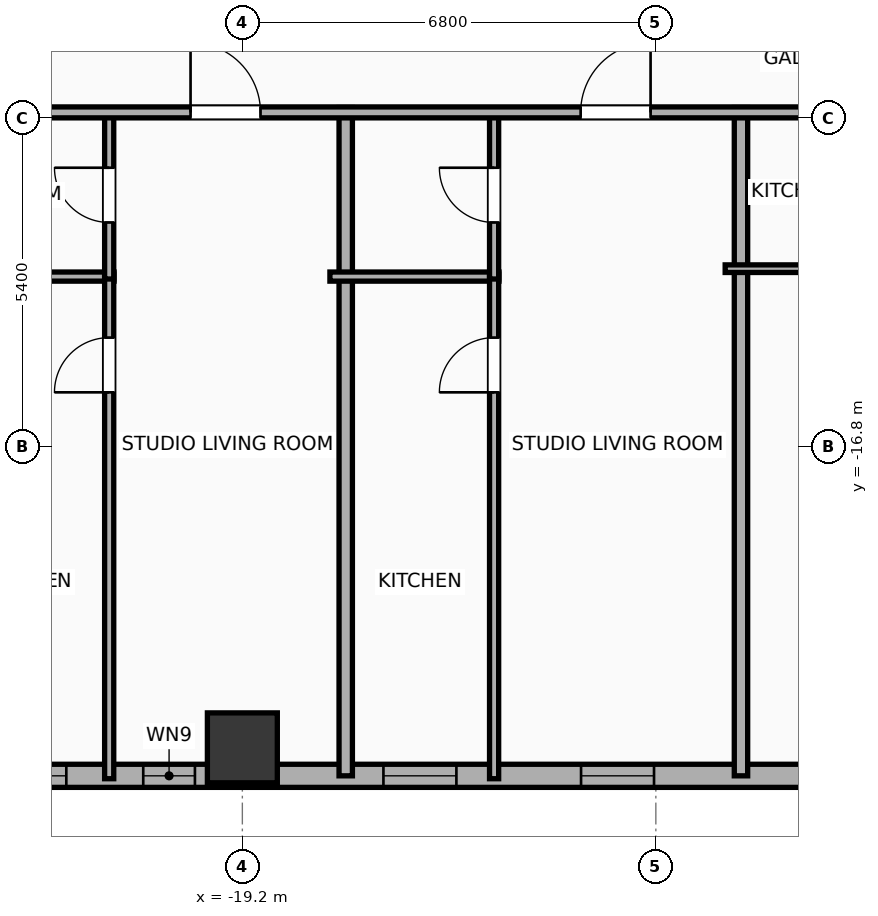
"""IFC4 building model, lengths in metres.
Left out: names, types, materials, properties, quantities, classifications, styles, units other than length and angle.
Written with IfcOpenShell. Run it as: python <this file> out.ifc"""

import sys

from ifc_helpers import new_model, si_unit, direction, frame, frame_2d, origin, origin_2d, place, context, subcontext, project, spatial, rectangle, hollow_rectangle, extrude, element, fill, save


model = new_model("IFC4")
c1 = context("Model", 3, precision=1e-05, world=origin(), true_north=direction((0.0, 1.0)))
c2 = subcontext(c1, "Body", "Model", "MODEL_VIEW")
j1 = project(units=[si_unit("LENGTHUNIT", "METRE"), si_unit("PLANEANGLEUNIT", "RADIAN")], contexts=[c1])
p1 = place(None, origin())
s1 = spatial("IfcSite", under=j1, at=p1, CompositionType="ELEMENT")
p2 = place(p1, origin())
s2 = spatial("IfcBuilding", under=s1, at=p2, CompositionType="ELEMENT")
p3 = place(p2, frame((0.0, 0.0, 49.4)))
s3 = spatial("IfcBuildingStorey", under=s2, at=p3, CompositionType="ELEMENT", Elevation=49.4)
p4 = place(p3, frame((-19.2, -21.75, 0.0), z_axis=(0.0, 0.0, 1.0), x_axis=(1.0, 0.0, 0.0)))
e1 = element("IfcColumn", 1, at=p4, inside=s3, PredefinedType="COLUMN", context=c2, shape_type="SweptSolid", body=[
    extrude(hollow_rectangle(XDim=1.15, YDim=1.15, WallThickness=0.04, at=origin_2d()), origin(), (0.0, 0.0, 1.0), 3.9),
])
p5 = place(p3, frame((22.381, -22.21, 0.0), z_axis=(0.0, 0.0, 1.0), x_axis=(-1.0, 0.0, 0.0)))
e2 = element("IfcWall", 2, at=p5, inside=s3, PredefinedType="ELEMENTEDWALL", context=c2, shape_type="SweptSolid", body=[
    extrude(rectangle(XDim=51.963, YDim=0.38, at=frame_2d((25.981, 0.0))), origin(), (0.0, 0.0, 1.0), 3.65),
])
p6 = place(p5, frame((49.952, 0.0, 0.75)))
e3 = element("IfcOpeningElement", 3, at=p6, cuts=e2, PredefinedType="OPENING", context=c2, shape_type="SweptSolid", body=[
    extrude(rectangle(XDim=1.2, YDim=2.05, at=frame_2d((0.6, 1.025))), frame((0.0, 0.2, 0.0), z_axis=(0.0, -1.0, 0.0), x_axis=(1.0, 0.0, 0.0)), (0.0, 0.0, 1.0), 0.4),
])
p7 = place(p5, frame((47.486, 0.0, 0.75)))
e4 = element("IfcOpeningElement", 4, at=p7, cuts=e2, PredefinedType="OPENING", context=c2, shape_type="SweptSolid", body=[
    extrude(rectangle(XDim=1.2, YDim=2.05, at=frame_2d((0.6, 1.025))), frame((0.0, 0.2, 0.0), z_axis=(0.0, -1.0, 0.0), x_axis=(1.0, 0.0, 0.0)), (0.0, 0.0, 1.0), 0.4),
])
p8 = place(p5, frame((42.361, 0.0, 0.75)))
e5 = element("IfcOpeningElement", 5, at=p8, cuts=e2, PredefinedType="OPENING", context=c2, shape_type="SweptSolid", body=[
    extrude(rectangle(XDim=0.85, YDim=2.05, at=frame_2d((0.425, 1.025))), frame((0.0, 0.2, 0.0), z_axis=(0.0, -1.0, 0.0), x_axis=(1.0, 0.0, 0.0)), (0.0, 0.0, 1.0), 0.4),
])
p9 = place(p5, frame((44.476, 0.0, 0.75)))
e6 = element("IfcOpeningElement", 6, at=p9, cuts=e2, PredefinedType="OPENING", context=c2, shape_type="SweptSolid", body=[
    extrude(rectangle(XDim=1.2, YDim=2.05, at=frame_2d((0.6, 1.025))), frame((0.0, 0.2, 0.0), z_axis=(0.0, -1.0, 0.0), x_axis=(1.0, 0.0, 0.0)), (0.0, 0.0, 1.0), 0.4),
])
p10 = place(p5, frame((34.811, 0.0, 0.75)))
e7 = element("IfcOpeningElement", 7, at=p10, cuts=e2, PredefinedType="OPENING", context=c2, shape_type="SweptSolid", body=[
    extrude(rectangle(XDim=1.2, YDim=2.05, at=frame_2d((0.6, 1.025))), frame((0.0, 0.2, 0.0), z_axis=(0.0, -1.0, 0.0), x_axis=(1.0, 0.0, 0.0)), (0.0, 0.0, 1.0), 0.4),
])
p11 = place(p5, frame((38.061, 0.0, 0.75)))
e8 = element("IfcOpeningElement", 8, at=p11, cuts=e2, PredefinedType="OPENING", context=c2, shape_type="SweptSolid", body=[
    extrude(rectangle(XDim=1.2, YDim=2.05, at=frame_2d((0.6, 1.025))), frame((0.0, 0.2, 0.0), z_axis=(0.0, -1.0, 0.0), x_axis=(1.0, 0.0, 0.0)), (0.0, 0.0, 1.0), 0.4),
])
p12 = place(p5, frame((29.171, 0.0, 0.75)))
e9 = element("IfcOpeningElement", 9, at=p12, cuts=e2, PredefinedType="OPENING", context=c2, shape_type="SweptSolid", body=[
    extrude(rectangle(XDim=1.2, YDim=2.05, at=frame_2d((0.6, 1.025))), frame((0.0, 0.2, 0.0), z_axis=(0.0, -1.0, 0.0), x_axis=(1.0, 0.0, 0.0)), (0.0, 0.0, 1.0), 0.4),
])
p13 = place(p5, frame((21.757, 0.0, 0.75)))
e10 = element("IfcOpeningElement", 10, at=p13, cuts=e2, PredefinedType="OPENING", context=c2, shape_type="SweptSolid", body=[
    extrude(rectangle(XDim=1.2, YDim=2.05, at=frame_2d((0.6, 1.025))), frame((0.0, 0.2, 0.0), z_axis=(0.0, -1.0, 0.0), x_axis=(1.0, 0.0, 0.0)), (0.0, 0.0, 1.0), 0.4),
])
p14 = place(p5, frame((25.007, 0.0, 0.75)))
e11 = element("IfcOpeningElement", 11, at=p14, cuts=e2, PredefinedType="OPENING", context=c2, shape_type="SweptSolid", body=[
    extrude(rectangle(XDim=1.2, YDim=2.05, at=frame_2d((0.6, 1.025))), frame((0.0, 0.2, 0.0), z_axis=(0.0, -1.0, 0.0), x_axis=(1.0, 0.0, 0.0)), (0.0, 0.0, 1.0), 0.4),
])
p15 = place(p5, frame((17.697, 0.0, 0.75)))
e12 = element("IfcOpeningElement", 12, at=p15, cuts=e2, PredefinedType="OPENING", context=c2, shape_type="SweptSolid", body=[
    extrude(rectangle(XDim=1.2, YDim=2.05, at=frame_2d((0.6, 1.025))), frame((0.0, 0.2, 0.0), z_axis=(0.0, -1.0, 0.0), x_axis=(1.0, 0.0, 0.0)), (0.0, 0.0, 1.0), 0.4),
])
p16 = place(p5, frame((14.447, 0.0, 0.75)))
e13 = element("IfcOpeningElement", 13, at=p16, cuts=e2, PredefinedType="OPENING", context=c2, shape_type="SweptSolid", body=[
    extrude(rectangle(XDim=1.2, YDim=2.05, at=frame_2d((0.6, 1.025))), frame((0.0, 0.2, 0.0), z_axis=(0.0, -1.0, 0.0), x_axis=(1.0, 0.0, 0.0)), (0.0, 0.0, 1.0), 0.4),
])
p17 = place(p5, frame((11.231, 0.0, 0.75)))
e14 = element("IfcOpeningElement", 14, at=p17, cuts=e2, PredefinedType="OPENING", context=c2, shape_type="SweptSolid", body=[
    extrude(rectangle(XDim=1.2, YDim=2.05, at=frame_2d((0.6, 1.025))), frame((0.0, 0.2, 0.0), z_axis=(0.0, -1.0, 0.0), x_axis=(1.0, 0.0, 0.0)), (0.0, 0.0, 1.0), 0.4),
])
p18 = place(p5, frame((5.082, 0.0, 0.75)))
e15 = element("IfcOpeningElement", 15, at=p18, cuts=e2, PredefinedType="OPENING", context=c2, shape_type="SweptSolid", body=[
    extrude(rectangle(XDim=1.2, YDim=2.05, at=frame_2d((0.6, 1.025))), frame((0.0, 0.2, 0.0), z_axis=(0.0, -1.0, 0.0), x_axis=(1.0, 0.0, 0.0)), (0.0, 0.0, 1.0), 0.4),
])
p19 = place(p5, frame((2.277, 0.0, 0.75)))
e16 = element("IfcOpeningElement", 16, at=p19, cuts=e2, PredefinedType="OPENING", context=c2, shape_type="SweptSolid", body=[
    extrude(rectangle(XDim=1.2, YDim=2.05, at=frame_2d((0.6, 1.025))), frame((0.0, 0.2, 0.0), z_axis=(0.0, -1.0, 0.0), x_axis=(1.0, 0.0, 0.0)), (0.0, 0.0, 1.0), 0.4),
])
p20 = place(p5, frame((1.071, 0.0, 0.75)))
e17 = element("IfcOpeningElement", 17, at=p20, cuts=e2, PredefinedType="OPENING", context=c2, shape_type="SweptSolid", body=[
    extrude(rectangle(XDim=0.52, YDim=2.05, at=frame_2d((0.26, 1.025))), frame((0.0, 0.2, 0.0), z_axis=(0.0, -1.0, 0.0), x_axis=(1.0, 0.0, 0.0)), (0.0, 0.0, 1.0), 0.4),
])
p21 = place(p3, frame((-24.26, -14.0, 0.0), z_axis=(0.0, 0.0, 1.0), x_axis=(1.0, 0.0, 0.0)))
e18 = element("IfcWall", 18, at=p21, inside=s3, PredefinedType="PLUMBINGWALL", context=c2, shape_type="SweptSolid", body=[
    extrude(rectangle(XDim=2.95, YDim=0.15, at=frame_2d((1.475, 0.0))), origin(), (0.0, 0.0, 1.0), 3.65),
])
p22 = place(p3, frame((-21.39, -22.258, 0.0), z_axis=(0.0, 0.0, 1.0), x_axis=(0.0, 1.0, 0.0)))
e19 = element("IfcWall", 19, at=p22, inside=s3, PredefinedType="PLUMBINGWALL", context=c2, shape_type="SweptSolid", body=[
    extrude(rectangle(XDim=8.298, YDim=0.15, at=frame_2d((4.149, 0.0))), origin(), (0.0, 0.0, 1.0), 3.65),
])
p23 = place(p22, frame((6.354, 0.0, 0.0)))
e20 = element("IfcOpeningElement", 20, at=p23, cuts=e19, PredefinedType="OPENING", context=c2, shape_type="SweptSolid", body=[
    extrude(rectangle(XDim=0.9, YDim=2.05, at=frame_2d((0.45, 1.025))), frame((0.0, 0.085, 0.0), z_axis=(0.0, -1.0, 0.0), x_axis=(1.0, 0.0, 0.0)), (0.0, 0.0, 1.0), 0.17),
])
p24 = place(p3, frame((-21.39, -14.04, 0.0), z_axis=(0.0, 0.0, 1.0), x_axis=(0.0, 1.0, 0.0)))
e21 = element("IfcWall", 21, at=p24, inside=s3, PredefinedType="PLUMBINGWALL", context=c2, shape_type="SweptSolid", body=[
    extrude(rectangle(XDim=2.76, YDim=0.15, at=frame_2d((1.38, 0.0))), origin(), (0.0, 0.0, 1.0), 3.65),
])
p25 = place(p24, frame((0.93, 0.0, 0.0)))
e22 = element("IfcOpeningElement", 22, at=p25, cuts=e21, PredefinedType="OPENING", context=c2, shape_type="SweptSolid", body=[
    extrude(rectangle(XDim=0.9, YDim=2.05, at=frame_2d((0.45, 1.025))), frame((0.0, 0.085, 0.0), z_axis=(0.0, -1.0, 0.0), x_axis=(1.0, 0.0, 0.0)), (0.0, 0.0, 1.0), 0.17),
])
p26 = place(p3, frame((-17.5, -22.21, 0.0), z_axis=(0.0, 0.0, 1.0), x_axis=(0.0, 1.0, 0.0)))
e23 = element("IfcWall", 23, at=p26, inside=s3, PredefinedType="PARTITIONING", context=c2, shape_type="SweptSolid", body=[
    extrude(rectangle(XDim=10.99, YDim=0.22, at=frame_2d((5.495, 0.0))), origin(), (0.0, 0.0, 1.0), 3.65),
])
p27 = place(p3, frame((-17.76, -14.0, 0.0), z_axis=(0.0, 0.0, 1.0), x_axis=(1.0, 0.0, 0.0)))
e24 = element("IfcWall", 24, at=p27, inside=s3, PredefinedType="PLUMBINGWALL", context=c2, shape_type="SweptSolid", body=[
    extrude(rectangle(XDim=2.78, YDim=0.15, at=frame_2d((1.39, 0.0))), origin(), (0.0, 0.0, 1.0), 3.65),
])
p28 = place(p3, frame((-15.06, -22.258, 0.0), z_axis=(0.0, 0.0, 1.0), x_axis=(0.0, 1.0, 0.0)))
e25 = element("IfcWall", 25, at=p28, inside=s3, PredefinedType="PLUMBINGWALL", context=c2, shape_type="SweptSolid", body=[
    extrude(rectangle(XDim=8.298, YDim=0.15, at=frame_2d((4.149, 0.0))), origin(), (0.0, 0.0, 1.0), 3.65),
])
p29 = place(p28, frame((6.354, 0.0, 0.0)))
e26 = element("IfcOpeningElement", 26, at=p29, cuts=e25, PredefinedType="OPENING", context=c2, shape_type="SweptSolid", body=[
    extrude(rectangle(XDim=0.9, YDim=2.05, at=frame_2d((0.45, 1.025))), frame((0.0, 0.085, 0.0), z_axis=(0.0, -1.0, 0.0), x_axis=(1.0, 0.0, 0.0)), (0.0, 0.0, 1.0), 0.17),
])
p30 = place(p3, frame((-15.06, -14.04, 0.0), z_axis=(0.0, 0.0, 1.0), x_axis=(0.0, 1.0, 0.0)))
e27 = element("IfcWall", 27, at=p30, inside=s3, PredefinedType="PLUMBINGWALL", context=c2, shape_type="SweptSolid", body=[
    extrude(rectangle(XDim=2.76, YDim=0.15, at=frame_2d((1.38, 0.0))), origin(), (0.0, 0.0, 1.0), 3.65),
])
p31 = place(p30, frame((0.93, 0.0, 0.0)))
e28 = element("IfcOpeningElement", 28, at=p31, cuts=e27, PredefinedType="OPENING", context=c2, shape_type="SweptSolid", body=[
    extrude(rectangle(XDim=0.9, YDim=2.05, at=frame_2d((0.45, 1.025))), frame((0.0, 0.085, 0.0), z_axis=(0.0, -1.0, 0.0), x_axis=(1.0, 0.0, 0.0)), (0.0, 0.0, 1.0), 0.17),
])
p32 = place(p3, frame((-11.0, -22.21, 0.0), z_axis=(0.0, 0.0, 1.0), x_axis=(0.0, 1.0, 0.0)))
e29 = element("IfcWall", 29, at=p32, inside=s3, PredefinedType="PARTITIONING", context=c2, shape_type="SweptSolid", body=[
    extrude(rectangle(XDim=10.99, YDim=0.22, at=frame_2d((5.495, 0.0))), origin(), (0.0, 0.0, 1.0), 2.94),
])
p33 = place(p3, frame((-11.26, -13.87, 0.0), z_axis=(0.0, 0.0, 1.0), x_axis=(1.0, 0.0, 0.0)))
e30 = element("IfcWall", 30, at=p33, inside=s3, PredefinedType="PARTITIONING", context=c2, shape_type="SweptSolid", body=[
    extrude(rectangle(XDim=2.804, YDim=0.125, at=frame_2d((1.402, 0.0))), origin(), (0.0, 0.0, 1.0), 3.65),
])
p34 = place(p3, frame((-33.41, -11.3, 0.0), z_axis=(0.0, 0.0, 1.0), x_axis=(1.0, 0.0, 0.0)))
e31 = element("IfcWall", 31, at=p34, inside=s3, PredefinedType="PARTITIONING", context=c2, shape_type="SweptSolid", body=[
    extrude(rectangle(XDim=59.62, YDim=0.18, at=frame_2d((29.81, 0.0))), origin(), (0.0, 0.0, 1.0), 3.65),
])
p35 = place(p34, frame((4.344, 0.0, 0.0)))
e32 = element("IfcOpeningElement", 32, at=p35, cuts=e31, PredefinedType="OPENING", context=c2, shape_type="SweptSolid", body=[
    extrude(rectangle(XDim=1.15, YDim=2.05, at=frame_2d((0.575, 1.025))), frame((0.0, 0.1, 0.0), z_axis=(0.0, -1.0, 0.0), x_axis=(1.0, 0.0, 0.0)), (0.0, 0.0, 1.0), 0.2),
])
p36 = place(p34, frame((13.358, 0.0, 0.0)))
e33 = element("IfcOpeningElement", 33, at=p36, cuts=e31, PredefinedType="OPENING", context=c2, shape_type="SweptSolid", body=[
    extrude(rectangle(XDim=1.15, YDim=2.05, at=frame_2d((0.575, 1.025))), frame((0.0, 0.1, 0.0), z_axis=(0.0, -1.0, 0.0), x_axis=(1.0, 0.0, 0.0)), (0.0, 0.0, 1.0), 0.2),
])
p37 = place(p34, frame((19.773, 0.0, 0.0)))
e34 = element("IfcOpeningElement", 34, at=p37, cuts=e31, PredefinedType="OPENING", context=c2, shape_type="SweptSolid", body=[
    extrude(rectangle(XDim=1.15, YDim=2.05, at=frame_2d((0.575, 1.025))), frame((0.0, 0.1, 0.0), z_axis=(0.0, -1.0, 0.0), x_axis=(1.0, 0.0, 0.0)), (0.0, 0.0, 1.0), 0.2),
])
p38 = place(p34, frame((25.336, 0.0, 0.0)))
e35 = element("IfcOpeningElement", 35, at=p38, cuts=e31, PredefinedType="OPENING", context=c2, shape_type="SweptSolid", body=[
    extrude(rectangle(XDim=0.9, YDim=2.05, at=frame_2d((0.45, 1.025))), frame((0.0, 0.1, 0.0), z_axis=(0.0, -1.0, 0.0), x_axis=(1.0, 0.0, 0.0)), (0.0, 0.0, 1.0), 0.2),
])
p39 = place(p34, frame((32.83, 0.0, 0.0)))
e36 = element("IfcOpeningElement", 36, at=p39, cuts=e31, PredefinedType="OPENING", context=c2, shape_type="SweptSolid", body=[
    extrude(rectangle(XDim=1.15, YDim=2.05, at=frame_2d((0.575, 1.025))), frame((0.0, 0.1, 0.0), z_axis=(0.0, -1.0, 0.0), x_axis=(1.0, 0.0, 0.0)), (0.0, 0.0, 1.0), 0.2),
])
p40 = place(p34, frame((36.95, 0.0, 0.0)))
e37 = element("IfcOpeningElement", 37, at=p40, cuts=e31, PredefinedType="OPENING", context=c2, shape_type="SweptSolid", body=[
    extrude(rectangle(XDim=1.15, YDim=2.05, at=frame_2d((0.575, 1.025))), frame((0.0, 0.1, 0.0), z_axis=(0.0, -1.0, 0.0), x_axis=(1.0, 0.0, 0.0)), (0.0, 0.0, 1.0), 0.2),
])
p41 = place(p34, frame((44.837, 0.0, 0.0)))
e38 = element("IfcOpeningElement", 38, at=p41, cuts=e31, PredefinedType="OPENING", context=c2, shape_type="SweptSolid", body=[
    extrude(rectangle(XDim=0.9, YDim=2.05, at=frame_2d((0.45, 1.025))), frame((0.0, 0.1, 0.0), z_axis=(0.0, -1.0, 0.0), x_axis=(1.0, 0.0, 0.0)), (0.0, 0.0, 1.0), 0.2),
])
p42 = place(p34, frame((49.565, 0.0, 0.0)))
e39 = element("IfcOpeningElement", 39, at=p42, cuts=e31, PredefinedType="OPENING", context=c2, shape_type="SweptSolid", body=[
    extrude(rectangle(XDim=1.15, YDim=2.05, at=frame_2d((0.575, 1.025))), frame((0.0, 0.1, 0.0), z_axis=(0.0, -1.0, 0.0), x_axis=(1.0, 0.0, 0.0)), (0.0, 0.0, 1.0), 0.2),
])
p43 = place(p34, frame((56.583, 0.0, 0.0)))
e40 = element("IfcOpeningElement", 40, at=p43, cuts=e31, PredefinedType="OPENING", context=c2, shape_type="SweptSolid", body=[
    extrude(rectangle(XDim=0.9, YDim=2.05, at=frame_2d((0.45, 1.025))), frame((0.0, 0.1, 0.0), z_axis=(0.0, -1.0, 0.0), x_axis=(1.0, 0.0, 0.0)), (0.0, 0.0, 1.0), 0.2),
])
p44 = place(p8, origin())
e41 = element("IfcWindow", 41, at=p44, inside=s3, PartitioningType="SINGLE_PANEL", PredefinedType="WINDOW", context=c2, shape_type="SweptSolid", body=[
    extrude(rectangle(XDim=0.85, YDim=2.05, at=frame_2d((0.425, 1.025))), frame((0.0, 0.03, 0.0), z_axis=(0.0, -1.0, 0.0), x_axis=(1.0, 0.0, 0.0)), (0.0, 0.0, 1.0), 0.06),
])
fill(e5, e41)
p45 = place(p9, origin())
e42 = element("IfcWindow", 42, at=p45, inside=s3, PartitioningType="SINGLE_PANEL", PredefinedType="WINDOW", context=c2, shape_type="SweptSolid", body=[
    extrude(rectangle(XDim=1.2, YDim=2.05, at=frame_2d((0.6, 1.025))), frame((0.0, 0.03, 0.0), z_axis=(0.0, -1.0, 0.0), x_axis=(1.0, 0.0, 0.0)), (0.0, 0.0, 1.0), 0.06),
])
fill(e6, e42)
p46 = place(p10, origin())
e43 = element("IfcWindow", 43, at=p46, inside=s3, PartitioningType="SINGLE_PANEL", PredefinedType="WINDOW", context=c2, shape_type="SweptSolid", body=[
    extrude(rectangle(XDim=1.2, YDim=2.05, at=frame_2d((0.6, 1.025))), frame((0.0, 0.03, 0.0), z_axis=(0.0, -1.0, 0.0), x_axis=(1.0, 0.0, 0.0)), (0.0, 0.0, 1.0), 0.06),
])
fill(e7, e43)
p47 = place(p11, origin())
e44 = element("IfcWindow", 44, at=p47, inside=s3, PartitioningType="SINGLE_PANEL", PredefinedType="WINDOW", context=c2, shape_type="SweptSolid", body=[
    extrude(rectangle(XDim=1.2, YDim=2.05, at=frame_2d((0.6, 1.025))), frame((0.0, 0.03, 0.0), z_axis=(0.0, -1.0, 0.0), x_axis=(1.0, 0.0, 0.0)), (0.0, 0.0, 1.0), 0.06),
])
fill(e8, e44)
p48 = place(p23, origin())
e45 = element("IfcDoor", 45, at=p48, inside=s3, OperationType="SINGLE_SWING_LEFT", PredefinedType="DOOR", context=c2, shape_type="SweptSolid", body=[
    extrude(rectangle(XDim=0.9, YDim=2.05, at=frame_2d((0.45, 1.025))), frame((0.0, 0.025, 0.0), z_axis=(0.0, -1.0, 0.0), x_axis=(1.0, 0.0, 0.0)), (0.0, 0.0, 1.0), 0.05),
])
fill(e20, e45)
p49 = place(p25, origin())
e46 = element("IfcDoor", 46, at=p49, inside=s3, OperationType="SINGLE_SWING_RIGHT", PredefinedType="DOOR", context=c2, shape_type="SweptSolid", body=[
    extrude(rectangle(XDim=0.9, YDim=2.05, at=frame_2d((0.45, 1.025))), frame((0.0, 0.025, 0.0), z_axis=(0.0, -1.0, 0.0), x_axis=(1.0, 0.0, 0.0)), (0.0, 0.0, 1.0), 0.05),
])
fill(e22, e46)
p50 = place(p29, origin())
e47 = element("IfcDoor", 47, at=p50, inside=s3, OperationType="SINGLE_SWING_LEFT", PredefinedType="DOOR", context=c2, shape_type="SweptSolid", body=[
    extrude(rectangle(XDim=0.9, YDim=2.05, at=frame_2d((0.45, 1.025))), frame((0.0, 0.025, 0.0), z_axis=(0.0, -1.0, 0.0), x_axis=(1.0, 0.0, 0.0)), (0.0, 0.0, 1.0), 0.05),
])
fill(e26, e47)
p51 = place(p31, origin())
e48 = element("IfcDoor", 48, at=p51, inside=s3, OperationType="SINGLE_SWING_RIGHT", PredefinedType="DOOR", context=c2, shape_type="SweptSolid", body=[
    extrude(rectangle(XDim=0.9, YDim=2.05, at=frame_2d((0.45, 1.025))), frame((0.0, 0.025, 0.0), z_axis=(0.0, -1.0, 0.0), x_axis=(1.0, 0.0, 0.0)), (0.0, 0.0, 1.0), 0.05),
])
fill(e28, e48)
p52 = place(p36, origin())
e49 = element("IfcDoor", 49, at=p52, inside=s3, OperationType="SINGLE_SWING_LEFT", PredefinedType="DOOR", context=c2, shape_type="SweptSolid", body=[
    extrude(rectangle(XDim=1.15, YDim=2.05, at=frame_2d((0.575, 1.025))), frame((0.0, 0.025, 0.0), z_axis=(0.0, -1.0, 0.0), x_axis=(1.0, 0.0, 0.0)), (0.0, 0.0, 1.0), 0.05),
])
fill(e33, e49)
p53 = place(p37, origin())
e50 = element("IfcDoor", 50, at=p53, inside=s3, OperationType="SINGLE_SWING_RIGHT", PredefinedType="DOOR", context=c2, shape_type="SweptSolid", body=[
    extrude(rectangle(XDim=1.15, YDim=2.05, at=frame_2d((0.575, 1.025))), frame((0.0, 0.025, 0.0), z_axis=(0.0, -1.0, 0.0), x_axis=(1.0, 0.0, 0.0)), (0.0, 0.0, 1.0), 0.05),
])
fill(e34, e50)
save(model, sys.argv[1])
